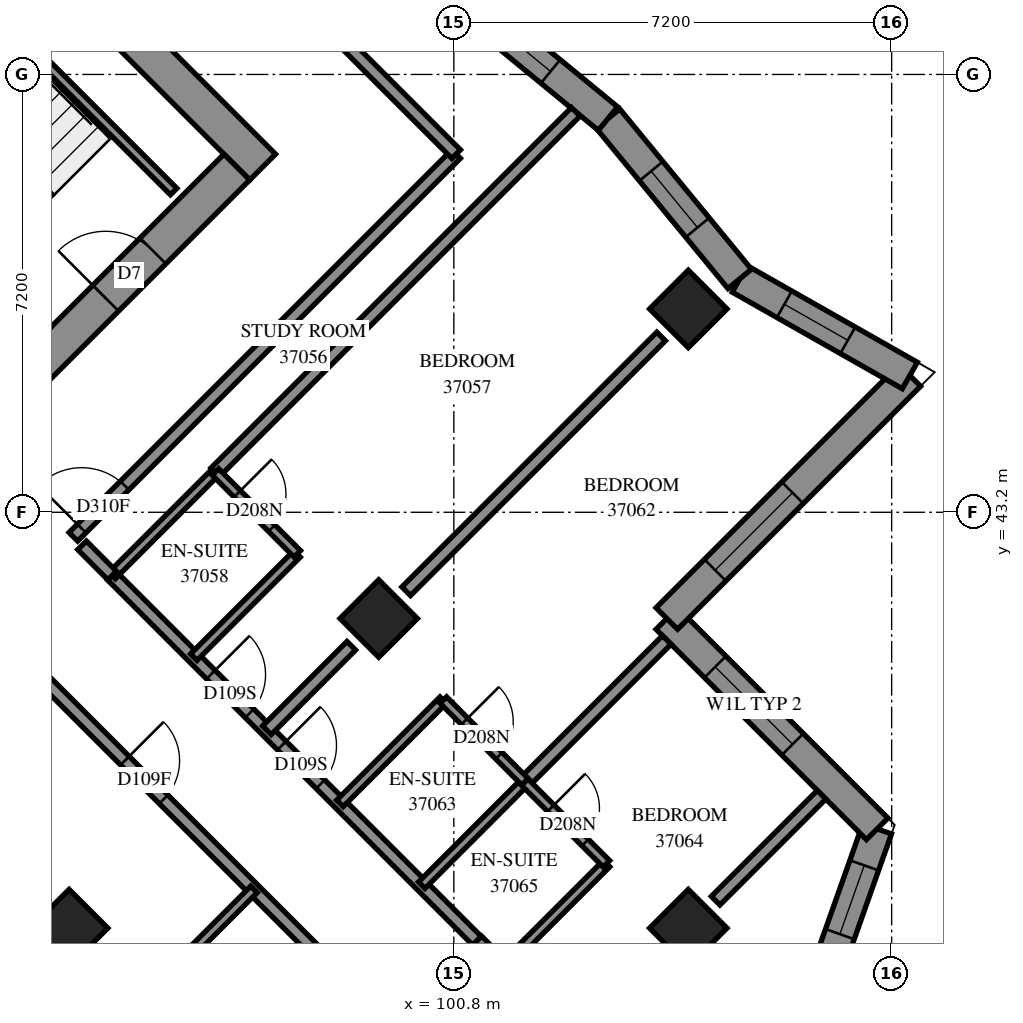
"""IFC4 building model, lengths in metres.
Left out: names, types, materials, properties, quantities, classifications, styles, units other than length and angle.
Written with IfcOpenShell. Run it as: python <this file> out.ifc"""

import sys

from ifc_helpers import new_model, si_unit, direction, frame, frame_2d, origin, origin_2d, place, context, subcontext, project, spatial, polyline, rectangle, outline, extrude, element, fill, save


model = new_model("IFC4")
c1 = context("Model", 3, precision=1e-05, world=origin(), true_north=direction((0.0, 1.0)))
c2 = subcontext(c1, "Body", "Model", "MODEL_VIEW")
j1 = project(units=[si_unit("LENGTHUNIT", "METRE"), si_unit("PLANEANGLEUNIT", "RADIAN")], contexts=[c1])
p1 = place(None, origin())
s1 = spatial("IfcSite", under=j1, at=p1, CompositionType="ELEMENT")
p2 = place(p1, origin())
s2 = spatial("IfcBuilding", under=s1, at=p2, CompositionType="ELEMENT")
p3 = place(p2, frame((0.0, 0.0, 138.8)))
s3 = spatial("IfcBuildingStorey", under=s2, at=p3, CompositionType="ELEMENT", Elevation=138.8)
for number, where, z_axis, x_axis in (
    (1, (104.656, 46.544, 0.0), (0.0, 0.0, 1.0), (0.707, -0.707, 0.0)),
    (2, (99.565, 41.453, 0.0), (0.0, 0.0, 1.0), (0.707, -0.707, 0.0)),
    (3, (94.474, 36.362, 0.0), (0.0, 0.0, 1.0), (0.707, -0.707, 0.0)),
    (4, (104.656, 36.362, 0.0), (0.0, 0.0, 1.0), (0.707, -0.707, 0.0)),
):
    element("IfcColumn", number, at=place(p3, frame(where, z_axis=z_axis, x_axis=x_axis)), inside=s3, PredefinedType="COLUMN", context=c2, shape_type="SweptSolid", body=[
        extrude(rectangle(XDim=0.9, YDim=0.9, at=origin_2d()), origin(), (0.0, 0.0, 1.0), 3.1),
    ])
p4 = place(p3, frame((86.625, 59.908, -0.3), z_axis=(0.0, 0.0, 1.0), x_axis=(0.7071067812, -0.7071067812, 0.0)))
e5 = element("IfcWall", 5, at=p4, inside=s3, PredefinedType="SHEAR", context=c2, shape_type="SweptSolid", body=[
    extrude(rectangle(XDim=15.6, YDim=0.6, at=frame_2d((7.8, 0.0))), origin(), (0.0, 0.0, 1.0), 2.7),
])
p5 = place(p4, frame((10.6, 0.0, 0.3)))
e6 = element("IfcOpeningElement", 6, at=p5, cuts=e5, PredefinedType="OPENING", context=c2, shape_type="SweptSolid", body=[
    extrude(rectangle(XDim=0.8, YDim=2.1, at=frame_2d((0.4, 1.05))), frame((0.0, 0.31, 0.0), z_axis=(0.0, -1.0, 0.0), x_axis=(1.0, 0.0, 0.0)), (0.0, 0.0, 1.0), 0.62),
])
p6 = place(p3, frame((87.049, 38.695, -0.3), z_axis=(0.0, 0.0, 1.0), x_axis=(0.7071067812, 0.7071067812, 0.0)))
e7 = element("IfcWall", 7, at=p6, inside=s3, PredefinedType="SHEAR", context=c2, shape_type="SweptSolid", body=[
    extrude(rectangle(XDim=14.4, YDim=0.6, at=frame_2d((7.2, 0.0))), origin(), (0.0, 0.0, 1.0), 2.7),
])
p7 = place(p6, frame((4.55, 0.0, 0.3)))
e8 = element("IfcOpeningElement", 8, at=p7, cuts=e7, PredefinedType="OPENING", context=c2, shape_type="SweptSolid", body=[
    extrude(rectangle(XDim=1.1, YDim=2.1, at=frame_2d((0.55, 1.05))), frame((0.0, 0.31, 0.0), z_axis=(0.0, -1.0, 0.0), x_axis=(1.0, 0.0, 0.0)), (0.0, 0.0, 1.0), 0.62),
])
p8 = place(p6, frame((11.35, 0.0, 0.3)))
e9 = element("IfcOpeningElement", 9, at=p8, cuts=e7, PredefinedType="OPENING", context=c2, shape_type="SweptSolid", body=[
    extrude(rectangle(XDim=1.1, YDim=2.1, at=frame_2d((0.55, 1.05))), frame((0.0, 0.31, 0.0), z_axis=(0.0, -1.0, 0.0), x_axis=(1.0, 0.0, 0.0)), (0.0, 0.0, 1.0), 0.62),
])
p9 = place(p3, frame((105.991, 32.994, 0.0), z_axis=(0.0, 0.0, 1.0), x_axis=(0.333866339, 0.9426204261, 0.0)))
e10 = element("IfcWall", 10, at=p9, inside=s3, PredefinedType="SOLIDWALL", context=c2, shape_type="SweptSolid", body=[
    extrude(outline(polyline([(-0.114, -0.25), (5.461, -0.25), (5.146, 0.25), (0.114, 0.25), (-0.114, -0.25)])), origin(), (0.0, 0.0, 1.0), 3.1),
])
p10 = place(p9, frame((1.151, 0.0, 0.45)))
e11 = element("IfcOpeningElement", 11, at=p10, cuts=e10, PredefinedType="OPENING", context=c2, shape_type="SweptSolid", body=[
    extrude(rectangle(XDim=1.2, YDim=2.5, at=frame_2d((0.6, 1.25))), frame((0.0, 0.26, 0.0), z_axis=(0.0, -1.0, 0.0), x_axis=(1.0, 0.0, 0.0)), (0.0, 0.0, 1.0), 0.52),
])
p11 = place(p9, frame((3.467, 0.0, 0.45)))
e12 = element("IfcOpeningElement", 12, at=p11, cuts=e10, PredefinedType="OPENING", context=c2, shape_type="SweptSolid", body=[
    extrude(rectangle(XDim=1.2, YDim=2.5, at=frame_2d((0.6, 1.25))), frame((0.0, 0.26, 0.0), z_axis=(0.0, -1.0, 0.0), x_axis=(1.0, 0.0, 0.0)), (0.0, 0.0, 1.0), 0.52),
])
p12 = place(p3, frame((107.762, 37.994, 0.0), z_axis=(0.0, 0.0, 1.0), x_axis=(-0.707127221, 0.7070863407, 0.0)))
e13 = element("IfcWall", 13, at=p12, inside=s3, PredefinedType="SOLIDWALL", context=c2, shape_type="SweptSolid", body=[
    extrude(outline(polyline([(-0.158, -0.25), (4.642, -0.25), (5.142, 0.25), (0.158, 0.25), (-0.158, -0.25)])), origin(), (0.0, 0.0, 1.0), 3.1),
])
p13 = place(p12, frame((1.967, 0.0, 0.6)))
e14 = element("IfcOpeningElement", 14, at=p13, cuts=e13, PredefinedType="OPENING", context=c2, shape_type="SweptSolid", body=[
    extrude(rectangle(XDim=1.8, YDim=1.9, at=frame_2d((0.9, 0.95))), frame((0.0, 0.26, 0.0), z_axis=(0.0, -1.0, 0.0), x_axis=(1.0, 0.0, 0.0)), (0.0, 0.0, 1.0), 0.52),
])
p14 = place(p3, frame((104.302, 41.453, 0.0), z_axis=(0.0, 0.0, 1.0), x_axis=(0.7071156278, 0.7070979344, 0.0)))
e15 = element("IfcWall", 15, at=p14, inside=s3, PredefinedType="SOLIDWALL", context=c2, shape_type="SweptSolid", body=[
    extrude(outline(polyline([(0.25, -0.25), (5.98, -0.25), (5.324, 0.25), (-0.25, 0.25), (0.25, -0.25)])), origin(), (0.0, 0.0, 1.0), 3.1),
])
p15 = place(p14, frame((1.125, 0.0, 0.6)))
e16 = element("IfcOpeningElement", 16, at=p15, cuts=e15, PredefinedType="OPENING", context=c2, shape_type="SweptSolid", body=[
    extrude(rectangle(XDim=1.8, YDim=1.9, at=frame_2d((0.9, 0.95))), frame((0.0, 0.26, 0.0), z_axis=(0.0, -1.0, 0.0), x_axis=(1.0, 0.0, 0.0)), (0.0, 0.0, 1.0), 0.52),
])
p16 = place(p3, frame((108.299, 45.449, 0.0), z_axis=(0.0, 0.0, 1.0), x_axis=(-0.869605489, 0.493747196, 0.0)))
e17 = element("IfcWall", 17, at=p16, inside=s3, PredefinedType="SOLIDWALL", context=c2, shape_type="SweptSolid", body=[
    extrude(outline(polyline([(-0.328, -0.25), (3.171, -0.25), (3.264, 0.25), (0.328, 0.25), (-0.328, -0.25)])), origin(), (0.0, 0.0, 1.0), 3.1),
])
p17 = place(p16, frame((1.173, 0.0, 0.45)))
e18 = element("IfcOpeningElement", 18, at=p17, cuts=e17, PredefinedType="OPENING", context=c2, shape_type="SweptSolid", body=[
    extrude(rectangle(XDim=1.2, YDim=2.5, at=frame_2d((0.6, 1.25))), frame((0.0, 0.26, 0.0), z_axis=(0.0, -1.0, 0.0), x_axis=(1.0, 0.0, 0.0)), (0.0, 0.0, 1.0), 0.52),
])
p18 = place(p3, frame((105.501, 47.038, 0.0), z_axis=(0.0, 0.0, 1.0), x_axis=(-0.6348900618, 0.7726024912, 0.0)))
e19 = element("IfcWall", 19, at=p18, inside=s3, PredefinedType="SOLIDWALL", context=c2, shape_type="SweptSolid", body=[
    extrude(outline(polyline([(0.046, -0.25), (3.436, -0.25), (3.387, 0.25), (-0.046, 0.25), (0.046, -0.25)])), origin(), (0.0, 0.0, 1.0), 3.1),
])
p19 = place(p18, frame((1.093, 0.0, 0.45)))
e20 = element("IfcOpeningElement", 20, at=p19, cuts=e19, PredefinedType="OPENING", context=c2, shape_type="SweptSolid", body=[
    extrude(rectangle(XDim=1.2, YDim=2.5, at=frame_2d((0.6, 1.25))), frame((0.0, 0.26, 0.0), z_axis=(0.0, -1.0, 0.0), x_axis=(1.0, 0.0, 0.0)), (0.0, 0.0, 1.0), 0.52),
])
p20 = place(p3, frame((103.335, 49.674, 0.0), z_axis=(0.0, 0.0, 1.0), x_axis=(-0.7725898055, 0.6349054988, 0.0)))
e21 = element("IfcWall", 21, at=p20, inside=s3, PredefinedType="SOLIDWALL", context=c2, shape_type="SweptSolid", body=[
    extrude(outline(polyline([(-0.025, -0.25), (3.365, -0.25), (3.414, 0.25), (0.025, 0.25), (-0.025, -0.25)])), origin(), (0.0, 0.0, 1.0), 3.1),
])
p21 = place(p20, frame((1.222, 0.0, 0.45)))
e22 = element("IfcOpeningElement", 22, at=p21, cuts=e21, PredefinedType="OPENING", context=c2, shape_type="SweptSolid", body=[
    extrude(rectangle(XDim=1.2, YDim=2.5, at=frame_2d((0.6, 1.25))), frame((0.0, 0.26, 0.0), z_axis=(0.0, -1.0, 0.0), x_axis=(1.0, 0.0, 0.0)), (0.0, 0.0, 1.0), 0.52),
])
p22 = place(p3, frame((91.313, 53.354, 0.0), z_axis=(0.0, 0.0, 1.0), x_axis=(0.7071140275, -0.7070995348, 0.0)))
e23 = element("IfcWall", 23, at=p22, inside=s3, PredefinedType="PARTITIONING", context=c2, shape_type="SweptSolid", body=[
    extrude(rectangle(XDim=6.9, YDim=0.15, at=frame_2d((3.45, 0.0))), origin(), (0.0, 0.0, 1.0), 3.1),
])
p23 = place(p3, frame((93.127, 41.379, 0.0), z_axis=(0.0, 0.0, 1.0), x_axis=(0.7071067812, -0.7071067812, 0.0)))
e24 = element("IfcWall", 24, at=p23, inside=s3, PredefinedType="PARTITIONING", context=c2, shape_type="SweptSolid", body=[
    extrude(rectangle(XDim=9.39, YDim=0.2, at=frame_2d((4.695, 0.0))), origin(), (0.0, 0.0, 1.0), 3.1),
])
p24 = place(p23, frame((3.2, 0.0, 0.0)))
e25 = element("IfcOpeningElement", 25, at=p24, cuts=e24, PredefinedType="OPENING", context=c2, shape_type="SweptSolid", body=[
    extrude(rectangle(XDim=0.9, YDim=2.1, at=frame_2d((0.45, 1.05))), frame((0.0, 0.11, 0.0), z_axis=(0.0, -1.0, 0.0), x_axis=(1.0, 0.0, 0.0)), (0.0, 0.0, 1.0), 0.22),
])
p25 = place(p3, frame((94.543, 42.797, 0.0), z_axis=(0.0, 0.0, 1.0), x_axis=(0.7071067812, 0.7071067812, 0.0)))
e26 = element("IfcWall", 26, at=p25, inside=s3, PredefinedType="PARTITIONING", context=c2, shape_type="SweptSolid", body=[
    extrude(rectangle(XDim=8.901, YDim=0.2, at=frame_2d((4.45, 0.0))), origin(), (0.0, 0.0, 1.0), 3.1),
])
p26 = place(p25, frame((0.193, 0.0, 0.0)))
e27 = element("IfcOpeningElement", 27, at=p26, cuts=e26, PredefinedType="OPENING", context=c2, shape_type="SweptSolid", body=[
    extrude(rectangle(XDim=1.0, YDim=2.1, at=frame_2d((0.5, 1.05))), frame((0.0, 0.11, 0.0), z_axis=(0.0, -1.0, 0.0), x_axis=(1.0, 0.0, 0.0)), (0.0, 0.0, 1.0), 0.22),
])
p27 = place(p3, frame((95.177, 42.157, 0.0), z_axis=(0.0, 0.0, 1.0), x_axis=(0.7071067812, -0.7071067812, 0.0)))
e28 = element("IfcWall", 28, at=p27, inside=s3, PredefinedType="PARTITIONING", context=c2, shape_type="SweptSolid", body=[
    extrude(rectangle(XDim=8.491, YDim=0.2, at=frame_2d((4.245, 0.0))), origin(), (0.0, 0.0, 1.0), 3.1),
])
p28 = place(p27, frame((2.3, 0.0, 0.0)))
e29 = element("IfcOpeningElement", 29, at=p28, cuts=e28, PredefinedType="OPENING", context=c2, shape_type="SweptSolid", body=[
    extrude(rectangle(XDim=0.9, YDim=2.1, at=frame_2d((0.45, 1.05))), frame((0.0, 0.11, 0.0), z_axis=(0.0, -1.0, 0.0), x_axis=(1.0, 0.0, 0.0)), (0.0, 0.0, 1.0), 0.22),
])
p29 = place(p27, frame((3.95, 0.0, 0.0)))
e30 = element("IfcOpeningElement", 30, at=p29, cuts=e28, PredefinedType="OPENING", context=c2, shape_type="SweptSolid", body=[
    extrude(rectangle(XDim=0.9, YDim=2.1, at=frame_2d((0.45, 1.05))), frame((0.0, 0.11, 0.0), z_axis=(0.0, -1.0, 0.0), x_axis=(1.0, 0.0, 0.0)), (0.0, 0.0, 1.0), 0.22),
])
p30 = place(p3, frame((96.877, 43.859, 0.0), z_axis=(0.0, 0.0, 1.0), x_axis=(0.707112746, 0.7071008163, 0.0)))
e31 = element("IfcWall", 31, at=p30, inside=s3, PredefinedType="PARTITIONING", context=c2, shape_type="SweptSolid", body=[
    extrude(rectangle(XDim=8.382, YDim=0.2, at=frame_2d((4.191, 0.0))), origin(), (0.0, 0.0, 1.0), 3.1),
])
p31 = place(p3, frame((100.017, 41.901, 0.0), z_axis=(0.0, 0.0, 1.0), x_axis=(0.7072754814, 0.7069380408, 0.0)))
e32 = element("IfcWall", 32, at=p31, inside=s3, PredefinedType="PARTITIONING", context=c2, shape_type="SweptSolid", body=[
    extrude(rectangle(XDim=5.927, YDim=0.2, at=frame_2d((2.963, 0.0))), origin(), (0.0, 0.0, 1.0), 3.1),
])
p32 = place(p3, frame((98.221, 51.705, 0.0), z_axis=(0.0, 0.0, 1.0), x_axis=(0.7073229887, -0.7068905075, 0.0)))
e33 = element("IfcWall", 33, at=p32, inside=s3, PredefinedType="PARTITIONING", context=c2, shape_type="SweptSolid", body=[
    extrude(rectangle(XDim=3.7, YDim=0.2, at=frame_2d((1.85, 0.0))), origin(), (0.0, 0.0, 1.0), 3.1),
])
p33 = place(p3, frame((101.968, 38.766, 0.0), z_axis=(0.0, 0.0, 1.0), x_axis=(0.7071067812, 0.7071067812, 0.0)))
e34 = element("IfcWall", 34, at=p33, inside=s3, PredefinedType="PARTITIONING", context=c2, shape_type="SweptSolid", body=[
    extrude(rectangle(XDim=3.3, YDim=0.2, at=frame_2d((1.65, 0.0))), origin(), (0.0, 0.0, 1.0), 3.1),
])
p34 = place(p3, frame((105.105, 36.813, 0.0), z_axis=(0.0, 0.0, 1.0), x_axis=(0.7071067812, 0.7071067812, 0.0)))
e35 = element("IfcWall", 35, at=p34, inside=s3, PredefinedType="PARTITIONING", context=c2, shape_type="SweptSolid", body=[
    extrude(rectangle(XDim=2.463, YDim=0.2, at=frame_2d((1.232, 0.0))), origin(), (0.0, 0.0, 1.0), 3.1),
])
for number, where, z_axis, x_axis in (
    (36, (96.523, 40.817, 0.0), (0.0, 0.0, 1.0), (0.707, 0.707, 0.0)),
    (37, (98.927, 38.413, 0.0), (0.0, 0.0, 1.0), (0.707, 0.707, 0.0)),
    (38, (95.179, 42.161, 0.0), (0.0, 0.0, 1.0), (0.707, 0.707, 0.0)),
):
    element("IfcWall", number, at=place(p3, frame(where, z_axis=z_axis, x_axis=x_axis)), inside=s3, PredefinedType="PARTITIONING", context=c2, shape_type="SweptSolid", body=[
        extrude(rectangle(XDim=2.401, YDim=0.15, at=frame_2d((1.201, 0.0))), origin(), (0.0, 0.0, 1.0), 3.1),
    ])
p35 = place(p3, frame((100.273, 37.067, 0.0), z_axis=(0.0, 0.0, 1.0), x_axis=(0.706689978, 0.7075233388, 0.0)))
e39 = element("IfcWall", 39, at=p35, inside=s3, PredefinedType="PARTITIONING", context=c2, shape_type="SweptSolid", body=[
    extrude(rectangle(XDim=2.4, YDim=0.15, at=frame_2d((1.2, 0.0))), origin(), (0.0, 0.0, 1.0), 3.1),
])
for number, where, z_axis, x_axis in (
    (40, (95.817, 35.303, 0.0), (0.0, 0.0, 1.0), (0.707, 0.707, 0.0)),
    (41, (101.615, 35.727, 0.0), (0.0, 0.0, 1.0), (0.707, 0.707, 0.0)),
):
    element("IfcWall", number, at=place(p3, frame(where, z_axis=z_axis, x_axis=x_axis)), inside=s3, PredefinedType="PARTITIONING", context=c2, shape_type="SweptSolid", body=[
        extrude(rectangle(XDim=2.398, YDim=0.15, at=frame_2d((1.199, 0.0))), origin(), (0.0, 0.0, 1.0), 3.1),
    ])
p36 = place(p3, frame((97.725, 39.615, 0.0), z_axis=(0.0, 0.0, 1.0), x_axis=(0.7065975219, 0.707615674, 0.0)))
e42 = element("IfcWall", 42, at=p36, inside=s3, PredefinedType="PARTITIONING", context=c2, shape_type="SweptSolid", body=[
    extrude(rectangle(XDim=1.964, YDim=0.2, at=frame_2d((0.982, 0.0))), origin(), (0.0, 0.0, 1.0), 3.1),
])
p37 = place(p3, frame((96.881, 43.861, 0.0), z_axis=(0.0, 0.0, 1.0), x_axis=(0.7071067812, -0.7071067812, 0.0)))
e43 = element("IfcWall", 43, at=p37, inside=s3, PredefinedType="PARTITIONING", context=c2, shape_type="SweptSolid", body=[
    extrude(rectangle(XDim=1.901, YDim=0.15, at=frame_2d((0.95, 0.0))), origin(), (0.0, 0.0, 1.0), 3.1),
])
p38 = place(p37, frame((0.505, 0.0, 0.0)))
e44 = element("IfcOpeningElement", 44, at=p38, cuts=e43, PredefinedType="OPENING", context=c2, shape_type="SweptSolid", body=[
    extrude(rectangle(XDim=0.8, YDim=2.1, at=frame_2d((0.4, 1.05))), frame((0.0, 0.085, 0.0), z_axis=(0.0, -1.0, 0.0), x_axis=(1.0, 0.0, 0.0)), (0.0, 0.0, 1.0), 0.17),
])
p39 = place(p3, frame((101.965, 38.763, 0.0), z_axis=(0.0, 0.0, 1.0), x_axis=(0.7071067812, -0.7071067812, 0.0)))
e45 = element("IfcWall", 45, at=p39, inside=s3, PredefinedType="PARTITIONING", context=c2, shape_type="SweptSolid", body=[
    extrude(rectangle(XDim=1.901, YDim=0.15, at=frame_2d((0.95, 0.0))), origin(), (0.0, 0.0, 1.0), 3.1),
])
p40 = place(p39, frame((0.608, 0.0, 0.0)))
e46 = element("IfcOpeningElement", 46, at=p40, cuts=e45, PredefinedType="OPENING", context=c2, shape_type="SweptSolid", body=[
    extrude(rectangle(XDim=0.8, YDim=2.1, at=frame_2d((0.4, 1.05))), frame((0.0, 0.085, 0.0), z_axis=(0.0, -1.0, 0.0), x_axis=(1.0, 0.0, 0.0)), (0.0, 0.0, 1.0), 0.17),
])
p41 = place(p3, frame((100.628, 40.112, 0.0), z_axis=(0.0, 0.0, 1.0), x_axis=(0.7065800724, -0.7076330979, 0.0)))
e47 = element("IfcWall", 47, at=p41, inside=s3, PredefinedType="PARTITIONING", context=c2, shape_type="SweptSolid", body=[
    extrude(rectangle(XDim=1.899, YDim=0.15, at=frame_2d((0.95, 0.0))), origin(), (0.0, 0.0, 1.0), 3.1),
])
p42 = place(p41, frame((0.493, 0.0, 0.0)))
e48 = element("IfcOpeningElement", 48, at=p42, cuts=e47, PredefinedType="OPENING", context=c2, shape_type="SweptSolid", body=[
    extrude(rectangle(XDim=0.8, YDim=2.1, at=frame_2d((0.4, 1.05))), frame((0.0, 0.085, 0.0), z_axis=(0.0, -1.0, 0.0), x_axis=(1.0, 0.0, 0.0)), (0.0, 0.0, 1.0), 0.17),
])
p43 = place(p3, frame((94.686, 42.656, 0.0), z_axis=(0.0, 0.0, 1.0), x_axis=(0.7056768426, -0.7085338339, 0.0)))
e49 = element("IfcWall", 49, at=p43, inside=s3, PredefinedType="PARTITIONING", context=c2, shape_type="SweptSolid", body=[
    extrude(rectangle(XDim=0.7, YDim=0.2, at=frame_2d((0.35, 0.0))), origin(), (0.0, 0.0, 1.0), 3.1),
])
p44 = place(p3, frame((101.186, 36.158, 0.0), z_axis=(0.0, 0.0, 1.0), x_axis=(0.7087454925, -0.7054642634, 0.0)))
e50 = element("IfcWall", 50, at=p44, inside=s3, PredefinedType="PARTITIONING", context=c2, shape_type="SweptSolid", body=[
    extrude(rectangle(XDim=0.61, YDim=0.2, at=frame_2d((0.305, 0.0))), origin(), (0.0, 0.0, 1.0), 3.1),
])
p45 = place(p11, origin())
e51 = element("IfcWindow", 51, at=p45, inside=s3, PartitioningType="SINGLE_PANEL", PredefinedType="WINDOW", context=c2, shape_type="SweptSolid", body=[
    extrude(rectangle(XDim=1.2, YDim=2.5, at=frame_2d((0.6, 1.25))), frame((0.0, 0.18, 0.0), z_axis=(0.0, -1.0, 0.0), x_axis=(1.0, 0.0, 0.0)), (0.0, 0.0, 1.0), 0.06),
])
fill(e12, e51)
p46 = place(p13, origin())
e52 = element("IfcWindow", 52, at=p46, inside=s3, PartitioningType="SINGLE_PANEL", PredefinedType="WINDOW", context=c2, shape_type="SweptSolid", body=[
    extrude(rectangle(XDim=1.8, YDim=1.9, at=frame_2d((0.9, 0.95))), frame((0.0, 0.18, 0.0), z_axis=(0.0, -1.0, 0.0), x_axis=(1.0, 0.0, 0.0)), (0.0, 0.0, 1.0), 0.06),
])
fill(e14, e52)
p47 = place(p15, origin())
e53 = element("IfcWindow", 53, at=p47, inside=s3, PartitioningType="SINGLE_PANEL", PredefinedType="WINDOW", context=c2, shape_type="SweptSolid", body=[
    extrude(rectangle(XDim=1.8, YDim=1.9, at=frame_2d((0.9, 0.95))), frame((0.0, 0.18, 0.0), z_axis=(0.0, -1.0, 0.0), x_axis=(1.0, 0.0, 0.0)), (0.0, 0.0, 1.0), 0.06),
])
fill(e16, e53)
p48 = place(p17, origin())
e54 = element("IfcWindow", 54, at=p48, inside=s3, PartitioningType="SINGLE_PANEL", PredefinedType="WINDOW", context=c2, shape_type="SweptSolid", body=[
    extrude(rectangle(XDim=1.2, YDim=2.5, at=frame_2d((0.6, 1.25))), frame((0.0, 0.18, 0.0), z_axis=(0.0, -1.0, 0.0), x_axis=(1.0, 0.0, 0.0)), (0.0, 0.0, 1.0), 0.06),
])
fill(e18, e54)
p49 = place(p19, origin())
e55 = element("IfcWindow", 55, at=p49, inside=s3, PartitioningType="SINGLE_PANEL", PredefinedType="WINDOW", context=c2, shape_type="SweptSolid", body=[
    extrude(rectangle(XDim=1.2, YDim=2.5, at=frame_2d((0.6, 1.25))), frame((0.0, 0.18, 0.0), z_axis=(0.0, -1.0, 0.0), x_axis=(1.0, 0.0, 0.0)), (0.0, 0.0, 1.0), 0.06),
])
fill(e20, e55)
p50 = place(p21, origin())
e56 = element("IfcWindow", 56, at=p50, inside=s3, PartitioningType="SINGLE_PANEL", PredefinedType="WINDOW", context=c2, shape_type="SweptSolid", body=[
    extrude(rectangle(XDim=1.2, YDim=2.5, at=frame_2d((0.6, 1.25))), frame((0.0, 0.18, 0.0), z_axis=(0.0, -1.0, 0.0), x_axis=(1.0, 0.0, 0.0)), (0.0, 0.0, 1.0), 0.06),
])
fill(e22, e56)
p51 = place(p8, origin())
e57 = element("IfcDoor", 57, at=p51, inside=s3, OperationType="SINGLE_SWING_RIGHT", PredefinedType="DOOR", context=c2, shape_type="SweptSolid", body=[
    extrude(rectangle(XDim=1.1, YDim=2.1, at=frame_2d((0.55, 1.05))), frame((0.0, 0.025, 0.0), z_axis=(0.0, -1.0, 0.0), x_axis=(1.0, 0.0, 0.0)), (0.0, 0.0, 1.0), 0.05),
])
fill(e9, e57)
p52 = place(p26, origin())
e58 = element("IfcDoor", 58, at=p52, inside=s3, OperationType="SINGLE_SWING_LEFT", PredefinedType="DOOR", context=c2, shape_type="SweptSolid", body=[
    extrude(rectangle(XDim=1.0, YDim=2.1, at=frame_2d((0.5, 1.05))), frame((0.0, 0.025, 0.0), z_axis=(0.0, -1.0, 0.0), x_axis=(1.0, 0.0, 0.0)), (0.0, 0.0, 1.0), 0.05),
])
fill(e27, e58)
p53 = place(p28, origin())
e59 = element("IfcDoor", 59, at=p53, inside=s3, OperationType="SINGLE_SWING_RIGHT", PredefinedType="DOOR", context=c2, shape_type="SweptSolid", body=[
    extrude(rectangle(XDim=0.9, YDim=2.1, at=frame_2d((0.45, 1.05))), frame((0.0, 0.025, 0.0), z_axis=(0.0, -1.0, 0.0), x_axis=(1.0, 0.0, 0.0)), (0.0, 0.0, 1.0), 0.05),
])
fill(e29, e59)
p54 = place(p38, origin())
e60 = element("IfcDoor", 60, at=p54, inside=s3, OperationType="SINGLE_SWING_RIGHT", PredefinedType="DOOR", context=c2, shape_type="SweptSolid", body=[
    extrude(rectangle(XDim=0.8, YDim=2.1, at=frame_2d((0.4, 1.05))), frame((0.0, 0.025, 0.0), z_axis=(0.0, -1.0, 0.0), x_axis=(1.0, 0.0, 0.0)), (0.0, 0.0, 1.0), 0.05),
])
fill(e44, e60)
p55 = place(p24, origin())
e61 = element("IfcDoor", 61, at=p55, inside=s3, OperationType="SINGLE_SWING_LEFT", PredefinedType="DOOR", context=c2, shape_type="SweptSolid", body=[
    extrude(rectangle(XDim=0.9, YDim=2.1, at=frame_2d((0.45, 1.05))), frame((0.0, 0.025, 0.0), z_axis=(0.0, -1.0, 0.0), x_axis=(1.0, 0.0, 0.0)), (0.0, 0.0, 1.0), 0.05),
])
fill(e25, e61)
p56 = place(p29, origin())
e62 = element("IfcDoor", 62, at=p56, inside=s3, OperationType="SINGLE_SWING_LEFT", PredefinedType="DOOR", context=c2, shape_type="SweptSolid", body=[
    extrude(rectangle(XDim=0.9, YDim=2.1, at=frame_2d((0.45, 1.05))), frame((0.0, 0.025, 0.0), z_axis=(0.0, -1.0, 0.0), x_axis=(1.0, 0.0, 0.0)), (0.0, 0.0, 1.0), 0.05),
])
fill(e30, e62)
p57 = place(p42, origin())
e63 = element("IfcDoor", 63, at=p57, inside=s3, OperationType="SINGLE_SWING_RIGHT", PredefinedType="DOOR", context=c2, shape_type="SweptSolid", body=[
    extrude(rectangle(XDim=0.8, YDim=2.1, at=frame_2d((0.4, 1.05))), frame((0.0, 0.025, 0.0), z_axis=(0.0, -1.0, 0.0), x_axis=(1.0, 0.0, 0.0)), (0.0, 0.0, 1.0), 0.05),
])
fill(e48, e63)
p58 = place(p40, origin())
e64 = element("IfcDoor", 64, at=p58, inside=s3, OperationType="SINGLE_SWING_RIGHT", PredefinedType="DOOR", context=c2, shape_type="SweptSolid", body=[
    extrude(rectangle(XDim=0.8, YDim=2.1, at=frame_2d((0.4, 1.05))), frame((0.0, 0.025, 0.0), z_axis=(0.0, -1.0, 0.0), x_axis=(1.0, 0.0, 0.0)), (0.0, 0.0, 1.0), 0.05),
])
fill(e46, e64)
save(model, sys.argv[1])
